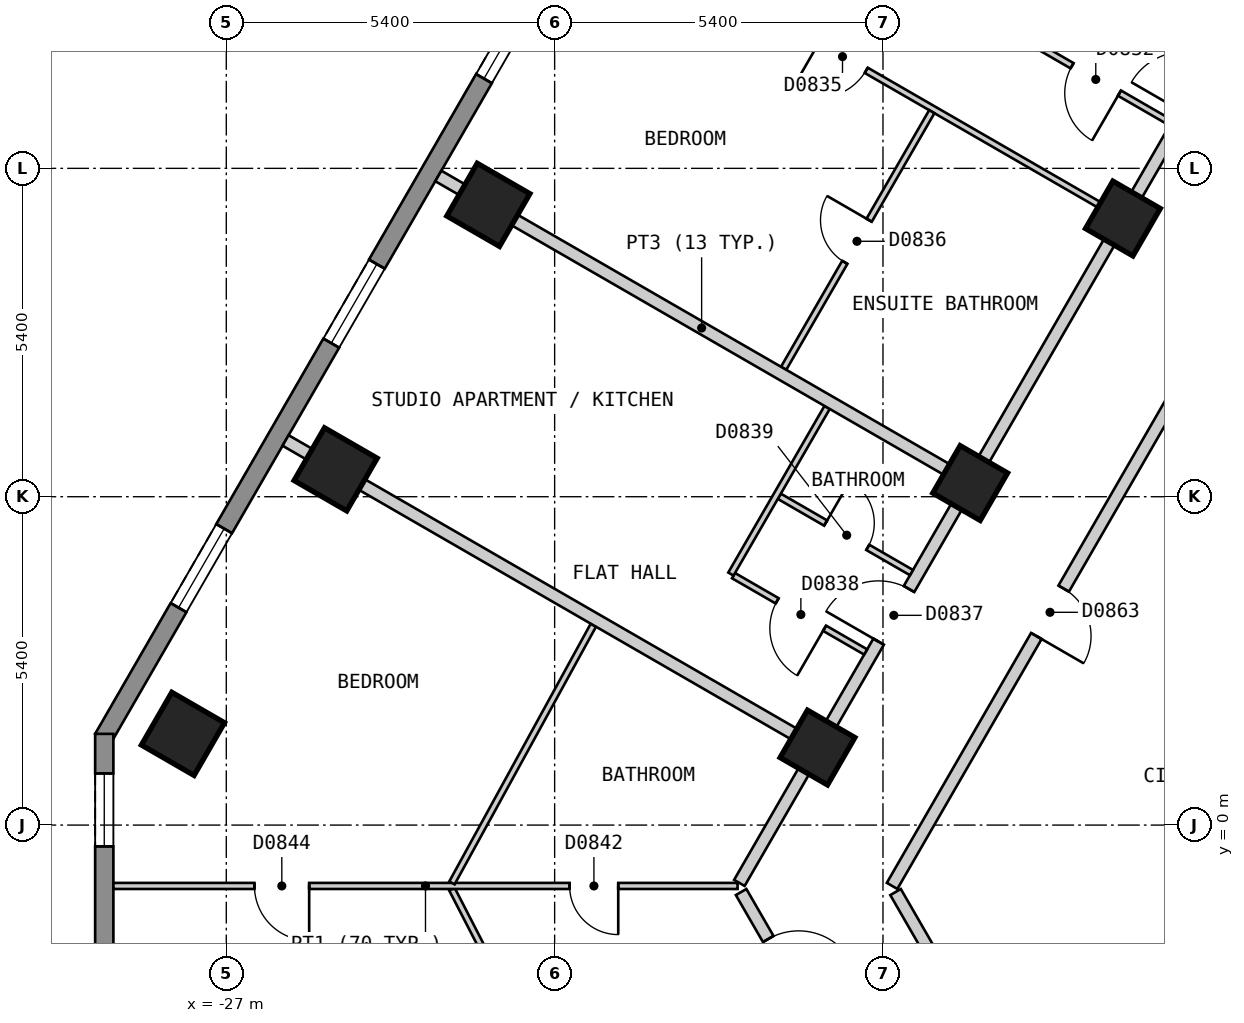
"""IFC4 building model, lengths in metres.
Left out: names, types, materials, properties, quantities, classifications, styles, units other than length and angle.
Written with IfcOpenShell. Run it as: python <this file> out.ifc"""

import sys

from ifc_helpers import new_model, si_unit, direction, frame, frame_2d, origin, origin_2d, place, context, subcontext, project, spatial, polyline, rectangle, outline, extrude, element, fill, save


model = new_model("IFC4")
c1 = context("Model", 3, precision=1e-05, world=origin(), true_north=direction((0.0, 1.0)))
c2 = subcontext(c1, "Body", "Model", "MODEL_VIEW")
j1 = project(units=[si_unit("LENGTHUNIT", "METRE"), si_unit("PLANEANGLEUNIT", "RADIAN")], contexts=[c1])
p1 = place(None, origin())
s1 = spatial("IfcSite", under=j1, at=p1, CompositionType="ELEMENT")
p2 = place(p1, origin())
s2 = spatial("IfcBuilding", under=s1, at=p2, CompositionType="ELEMENT")
p3 = place(p2, frame((0.0, 0.0, 72.0)))
s3 = spatial("IfcBuildingStorey", under=s2, at=p3, CompositionType="ELEMENT", Elevation=72.0)
for number, where, z_axis, x_axis in (
    (1, (-22.69, 10.2, 0.0), (0.0, 0.0, 1.0), (-0.5, -0.866, 0.0)),
    (2, (-25.202, 5.85, 0.0), (0.0, 0.0, 1.0), (-0.5, -0.866, 0.0)),
    (3, (-27.713, 1.5, 0.0), (0.0, 0.0, 1.0), (-0.5, -0.866, 0.0)),
):
    element("IfcColumn", number, at=place(p3, frame(where, z_axis=z_axis, x_axis=x_axis)), inside=s3, PredefinedType="COLUMN", context=c2, shape_type="SweptSolid", body=[
        extrude(rectangle(XDim=1.0, YDim=1.0, at=origin_2d()), origin(), (0.0, 0.0, 1.0), 3.0),
    ])
for number, where, z_axis, x_axis in (
    (4, (-12.254, 9.975, 0.0), (0.0, 0.0, 1.0), (-0.5, -0.866, 0.0)),
    (5, (-14.766, 5.625, 0.0), (0.0, 0.0, 1.0), (-0.5, -0.866, 0.0)),
    (6, (-17.277, 1.275, 0.0), (0.0, 0.0, 1.0), (-0.5, -0.866, 0.0)),
):
    element("IfcColumn", number, at=place(p3, frame(where, z_axis=z_axis, x_axis=x_axis)), inside=s3, PredefinedType="COLUMN", context=c2, shape_type="SweptSolid", body=[
        extrude(rectangle(XDim=0.9, YDim=0.9, at=origin_2d()), origin(), (0.0, 0.0, 1.0), 3.0),
    ])
p4 = place(p3, frame((-15.747, 24.425, 0.0), z_axis=(0.0, 0.0, 1.0), x_axis=(-0.500027479704, -0.866009537788, 0.0)))
e7 = element("IfcWall", 7, at=p4, inside=s3, PredefinedType="SOLIDWALL", context=c2, shape_type="SweptSolid", body=[
    extrude(outline(polyline([(0.0, -0.15), (26.559, -0.15), (26.478, 0.15), (0.08, 0.15), (0.0, -0.15)])), origin(), (0.0, 0.0, 1.0), 2.7),
])
p5 = place(p4, frame((2.483, 0.0, 0.15)))
e8 = element("IfcOpeningElement", 8, at=p5, cuts=e7, PredefinedType="OPENING", context=c2, shape_type="SweptSolid", body=[
    extrude(rectangle(XDim=1.5, YDim=2.1, at=frame_2d((0.75, 1.05))), frame((0.0, 0.16, 0.0), z_axis=(0.0, -1.0, 0.0), x_axis=(1.0, 0.0, 0.0)), (0.0, 0.0, 1.0), 0.32),
])
p6 = place(p4, frame((7.506, 0.0, 0.15)))
e9 = element("IfcOpeningElement", 9, at=p6, cuts=e7, PredefinedType="OPENING", context=c2, shape_type="SweptSolid", body=[
    extrude(rectangle(XDim=1.5, YDim=2.1, at=frame_2d((0.75, 1.05))), frame((0.0, 0.16, 0.0), z_axis=(0.0, -1.0, 0.0), x_axis=(1.0, 0.0, 0.0)), (0.0, 0.0, 1.0), 0.32),
])
p7 = place(p4, frame((12.529, 0.0, 0.15)))
e10 = element("IfcOpeningElement", 10, at=p7, cuts=e7, PredefinedType="OPENING", context=c2, shape_type="SweptSolid", body=[
    extrude(rectangle(XDim=1.5, YDim=2.1, at=frame_2d((0.75, 1.05))), frame((0.0, 0.16, 0.0), z_axis=(0.0, -1.0, 0.0), x_axis=(1.0, 0.0, 0.0)), (0.0, 0.0, 1.0), 0.32),
])
p8 = place(p4, frame((17.552, 0.0, 0.15)))
e11 = element("IfcOpeningElement", 11, at=p8, cuts=e7, PredefinedType="OPENING", context=c2, shape_type="SweptSolid", body=[
    extrude(rectangle(XDim=1.5, YDim=2.1, at=frame_2d((0.75, 1.05))), frame((0.0, 0.16, 0.0), z_axis=(0.0, -1.0, 0.0), x_axis=(1.0, 0.0, 0.0)), (0.0, 0.0, 1.0), 0.32),
])
p9 = place(p4, frame((22.575, 0.0, 0.15)))
e12 = element("IfcOpeningElement", 12, at=p9, cuts=e7, PredefinedType="OPENING", context=c2, shape_type="SweptSolid", body=[
    extrude(rectangle(XDim=1.5, YDim=2.1, at=frame_2d((0.75, 1.05))), frame((0.0, 0.16, 0.0), z_axis=(0.0, -1.0, 0.0), x_axis=(1.0, 0.0, 0.0)), (0.0, 0.0, 1.0), 0.32),
])
p10 = place(p3, frame((-29.007, 1.5, 0.0), z_axis=(0.0, 0.0, 1.0), x_axis=(0.0, -1.0, 0.0)))
e13 = element("IfcWall", 13, at=p10, inside=s3, PredefinedType="SOLIDWALL", context=c2, shape_type="SweptSolid", body=[
    extrude(outline(polyline([(0.0, -0.15), (5.0, -0.15), (4.92, 0.15), (0.08, 0.15), (0.0, -0.15)])), origin(), (0.0, 0.0, 1.0), 2.7),
])
p11 = place(p10, frame((0.65, 0.0, 0.15)))
e14 = element("IfcOpeningElement", 14, at=p11, cuts=e13, PredefinedType="OPENING", context=c2, shape_type="SweptSolid", body=[
    extrude(rectangle(XDim=1.2, YDim=2.1, at=frame_2d((0.6, 1.05))), frame((0.0, 0.16, 0.0), z_axis=(0.0, -1.0, 0.0), x_axis=(1.0, 0.0, 0.0)), (0.0, 0.0, 1.0), 0.32),
])
p12 = place(p3, frame((-15.993, -1.101, 0.0), z_axis=(0.0, 0.0, 1.0), x_axis=(0.499894174133, -0.866086493757, 0.0)))
e15 = element("IfcWall", 15, at=p12, inside=s3, PredefinedType="PARTITIONING", context=c2, shape_type="SweptSolid", body=[
    extrude(rectangle(XDim=1.846, YDim=0.2, at=frame_2d((0.923, 0.0))), origin(), (0.0, 0.0, 1.0), 2.7),
])
p13 = place(p3, frame((-18.533, -1.101, 0.0), z_axis=(0.0, 0.0, 1.0), x_axis=(0.500022085096, -0.866012652573, 0.0)))
e16 = element("IfcWall", 16, at=p13, inside=s3, PredefinedType="PARTITIONING", context=c2, shape_type="SweptSolid", body=[
    extrude(rectangle(XDim=6.066, YDim=0.2, at=frame_2d((3.033, 0.0))), origin(), (0.0, 0.0, 1.0), 2.7),
])
p14 = place(p13, frame((0.892, 0.0, 0.0)))
e17 = element("IfcOpeningElement", 17, at=p14, cuts=e16, PredefinedType="OPENING", context=c2, shape_type="SweptSolid", body=[
    extrude(rectangle(XDim=1.0, YDim=2.1, at=frame_2d((0.5, 1.05))), frame((0.0, 0.11, 0.0), z_axis=(0.0, -1.0, 0.0), x_axis=(1.0, 0.0, 0.0)), (0.0, 0.0, 1.0), 0.22),
])
p15 = place(p3, frame((-16.05, -1.0, 0.0), z_axis=(0.0, 0.0, 1.0), x_axis=(0.499962449088, 0.866047082728, 0.0)))
e18 = element("IfcWall", 18, at=p15, inside=s3, PredefinedType="PARTITIONING", context=c2, shape_type="SweptSolid", body=[
    extrude(rectangle(XDim=10.391, YDim=0.2, at=frame_2d((5.195, 0.0))), origin(), (0.0, 0.0, 1.0), 2.7),
])
p16 = place(p15, frame((4.745, 0.0, 0.0)))
e19 = element("IfcOpeningElement", 19, at=p16, cuts=e18, PredefinedType="OPENING", context=c2, shape_type="SweptSolid", body=[
    extrude(rectangle(XDim=0.9, YDim=2.1, at=frame_2d((0.45, 1.05))), frame((0.0, 0.11, 0.0), z_axis=(0.0, -1.0, 0.0), x_axis=(1.0, 0.0, 0.0)), (0.0, 0.0, 1.0), 0.22),
])
p17 = place(p3, frame((-18.562, -0.951, 0.0), z_axis=(0.0, 0.0, 1.0), x_axis=(0.499992962407, 0.866029466902, 0.0)))
e20 = element("IfcWall", 20, at=p17, inside=s3, PredefinedType="PARTITIONING", context=c2, shape_type="SweptSolid", body=[
    extrude(rectangle(XDim=20.208, YDim=0.2, at=frame_2d((10.104, 0.0))), origin(), (0.0, 0.0, 1.0), 2.7),
])
p18 = place(p17, frame((14.627, 0.0, 0.0)))
e21 = element("IfcOpeningElement", 21, at=p18, cuts=e20, PredefinedType="OPENING", context=c2, shape_type="SweptSolid", body=[
    extrude(rectangle(XDim=1.0, YDim=2.1, at=frame_2d((0.5, 1.05))), frame((0.0, 0.11, 0.0), z_axis=(0.0, -1.0, 0.0), x_axis=(1.0, 0.0, 0.0)), (0.0, 0.0, 1.0), 0.22),
])
p19 = place(p17, frame((4.581, 0.0, 0.0)))
e22 = element("IfcOpeningElement", 22, at=p19, cuts=e20, PredefinedType="OPENING", context=c2, shape_type="SweptSolid", body=[
    extrude(rectangle(XDim=1.0, YDim=2.1, at=frame_2d((0.5, 1.05))), frame((0.0, 0.11, 0.0), z_axis=(0.0, -1.0, 0.0), x_axis=(1.0, 0.0, 0.0)), (0.0, 0.0, 1.0), 0.22),
])
p20 = place(p3, frame((-23.289, -1.054, 0.0), z_axis=(0.0, 0.0, 1.0), x_axis=(0.458226112305, -0.888835659726, 0.0)))
e23 = element("IfcWall", 23, at=p20, inside=s3, PredefinedType="PARTITIONING", context=c2, shape_type="SweptSolid", body=[
    extrude(rectangle(XDim=2.104, YDim=0.1, at=frame_2d((1.052, 0.0))), origin(), (0.0, 0.0, 1.0), 2.7),
])
p21 = place(p3, frame((-17.905, 5.407, 0.0), z_axis=(0.0, 0.0, 1.0), x_axis=(0.866080321209, -0.499904868165, 0.0)))
e24 = element("IfcWall", 24, at=p21, inside=s3, PredefinedType="PARTITIONING", context=c2, shape_type="SweptSolid", body=[
    extrude(rectangle(XDim=2.51, YDim=0.1, at=frame_2d((1.255, 0.0))), origin(), (0.0, 0.0, 1.0), 2.7),
])
p22 = place(p21, frame((0.88, 0.0, 0.0)))
e25 = element("IfcOpeningElement", 25, at=p22, cuts=e24, PredefinedType="OPENING", context=c2, shape_type="SweptSolid", body=[
    extrude(rectangle(XDim=0.8, YDim=2.1, at=frame_2d((0.4, 1.05))), frame((0.0, 0.06, 0.0), z_axis=(0.0, -1.0, 0.0), x_axis=(1.0, 0.0, 0.0)), (0.0, 0.0, 1.0), 0.12),
])
p23 = place(p3, frame((-18.658, 4.102, 0.0), z_axis=(0.0, 0.0, 1.0), x_axis=(0.865916579361, -0.500188442078, 0.0)))
e26 = element("IfcWall", 26, at=p23, inside=s3, PredefinedType="PARTITIONING", context=c2, shape_type="SweptSolid", body=[
    extrude(rectangle(XDim=2.509, YDim=0.1, at=frame_2d((1.255, 0.0))), origin(), (0.0, 0.0, 1.0), 2.7),
])
p24 = place(p23, frame((0.829, 0.0, 0.0)))
e27 = element("IfcOpeningElement", 27, at=p24, cuts=e26, PredefinedType="OPENING", context=c2, shape_type="SweptSolid", body=[
    extrude(rectangle(XDim=0.9, YDim=2.1, at=frame_2d((0.45, 1.05))), frame((0.0, 0.06, 0.0), z_axis=(0.0, -1.0, 0.0), x_axis=(1.0, 0.0, 0.0)), (0.0, 0.0, 1.0), 0.12),
])
p25 = place(p3, frame((-13.981, 13.002, 0.0), z_axis=(0.0, 0.0, 1.0), x_axis=(0.86595634977, -0.500119585993, 0.0)))
e28 = element("IfcWall", 28, at=p25, inside=s3, PredefinedType="PARTITIONING", context=c2, shape_type="SweptSolid", body=[
    extrude(rectangle(XDim=2.909, YDim=0.1, at=frame_2d((1.455, 0.0))), origin(), (0.0, 0.0, 1.0), 2.7),
])
p26 = place(p25, frame((1.029, 0.0, 0.0)))
e29 = element("IfcOpeningElement", 29, at=p26, cuts=e28, PredefinedType="OPENING", context=c2, shape_type="SweptSolid", body=[
    extrude(rectangle(XDim=0.9, YDim=2.1, at=frame_2d((0.45, 1.05))), frame((0.0, 0.06, 0.0), z_axis=(0.0, -1.0, 0.0), x_axis=(1.0, 0.0, 0.0)), (0.0, 0.0, 1.0), 0.12),
])
p27 = place(p3, frame((-21.001, 15.025, 0.0), z_axis=(0.0, 0.0, 1.0), x_axis=(0.866016855193, -0.500014806302, 0.0)))
e30 = element("IfcWall", 30, at=p27, inside=s3, PredefinedType="PARTITIONING", context=c2, shape_type="SweptSolid", body=[
    extrude(rectangle(XDim=10.0, YDim=0.1, at=frame_2d((5.0, 0.0))), origin(), (0.0, 0.0, 1.0), 2.7),
])
p28 = place(p27, frame((4.325, 0.0, 0.0)))
e31 = element("IfcOpeningElement", 31, at=p28, cuts=e30, PredefinedType="OPENING", context=c2, shape_type="SweptSolid", body=[
    extrude(rectangle(XDim=0.9, YDim=2.1, at=frame_2d((0.45, 1.05))), frame((0.0, 0.06, 0.0), z_axis=(0.0, -1.0, 0.0), x_axis=(1.0, 0.0, 0.0)), (0.0, 0.0, 1.0), 0.12),
])
p29 = place(p3, frame((-28.857, -1.001, 0.0), z_axis=(0.0, 0.0, 1.0), x_axis=(1.0, 0.0, 0.0)))
e32 = element("IfcWall", 32, at=p29, inside=s3, PredefinedType="PARTITIONING", context=c2, shape_type="SweptSolid", body=[
    extrude(rectangle(XDim=10.266, YDim=0.1, at=frame_2d((5.133, 0.0))), origin(), (0.0, 0.0, 1.0), 2.7),
])
p30 = place(p29, frame((7.503, 0.0, 0.0)))
e33 = element("IfcOpeningElement", 33, at=p30, cuts=e32, PredefinedType="OPENING", context=c2, shape_type="SweptSolid", body=[
    extrude(rectangle(XDim=0.8, YDim=2.1, at=frame_2d((0.4, 1.05))), frame((0.0, 0.06, 0.0), z_axis=(0.0, -1.0, 0.0), x_axis=(1.0, 0.0, 0.0)), (0.0, 0.0, 1.0), 0.12),
])
p31 = place(p29, frame((2.32, 0.0, 0.0)))
e34 = element("IfcOpeningElement", 34, at=p31, cuts=e32, PredefinedType="OPENING", context=c2, shape_type="SweptSolid", body=[
    extrude(rectangle(XDim=0.9, YDim=2.1, at=frame_2d((0.45, 1.05))), frame((0.0, 0.06, 0.0), z_axis=(0.0, -1.0, 0.0), x_axis=(1.0, 0.0, 0.0)), (0.0, 0.0, 1.0), 0.12),
])
p32 = place(p3, frame((-18.701, 4.128, 0.0), z_axis=(0.0, 0.0, 1.0), x_axis=(0.500023029176, 0.866012107475, 0.0)))
e35 = element("IfcWall", 35, at=p32, inside=s3, PredefinedType="PARTITIONING", context=c2, shape_type="SweptSolid", body=[
    extrude(rectangle(XDim=3.164, YDim=0.1, at=frame_2d((1.582, 0.0))), origin(), (0.0, 0.0, 1.0), 2.7),
])
p33 = place(p3, frame((-17.834, 7.512, 0.0), z_axis=(0.0, 0.0, 1.0), x_axis=(0.500093956194, 0.865971151354, 0.0)))
e36 = element("IfcWall", 36, at=p33, inside=s3, PredefinedType="PARTITIONING", context=c2, shape_type="SweptSolid", body=[
    extrude(rectangle(XDim=4.873, YDim=0.1, at=frame_2d((2.437, 0.0))), origin(), (0.0, 0.0, 1.0), 2.7),
])
p34 = place(p33, frame((2.012, 0.0, 0.0)))
e37 = element("IfcOpeningElement", 37, at=p34, cuts=e36, PredefinedType="OPENING", context=c2, shape_type="SweptSolid", body=[
    extrude(rectangle(XDim=0.8, YDim=2.1, at=frame_2d((0.4, 1.05))), frame((0.0, 0.06, 0.0), z_axis=(0.0, -1.0, 0.0), x_axis=(1.0, 0.0, 0.0)), (0.0, 0.0, 1.0), 0.12),
])
p35 = place(p3, frame((-23.289, -0.951, 0.0), z_axis=(0.0, 0.0, 1.0), x_axis=(0.481164463081, 0.876630343684, 0.0)))
e38 = element("IfcWall", 38, at=p35, inside=s3, PredefinedType="PARTITIONING", context=c2, shape_type="SweptSolid", body=[
    extrude(rectangle(XDim=4.834, YDim=0.1, at=frame_2d((2.417, 0.0))), origin(), (0.0, 0.0, 1.0), 2.7),
])
for number, where, z_axis, x_axis in (
    (39, (-26.025, 6.325, 0.0), (0.0, 0.0, 1.0), (0.866, -0.5, 0.0)),
    (40, (-23.513, 10.675, 0.0), (0.0, 0.0, 1.0), (0.866, -0.5, 0.0)),
):
    element("IfcWall", number, at=place(p3, frame(where, z_axis=z_axis, x_axis=x_axis)), inside=s3, PredefinedType="PARTITIONING", context=c2, shape_type="SweptSolid", body=[
        extrude(rectangle(XDim=10.0, YDim=0.2, at=frame_2d((5.0, 0.0))), origin(), (0.0, 0.0, 1.0), 2.7),
    ])
p36 = place(p7, origin())
e41 = element("IfcWindow", 41, at=p36, inside=s3, PartitioningType="SINGLE_PANEL", PredefinedType="WINDOW", context=c2, shape_type="SweptSolid", body=[
    extrude(rectangle(XDim=1.5, YDim=2.1, at=frame_2d((0.75, 1.05))), frame((0.0, 0.03, 0.0), z_axis=(0.0, -1.0, 0.0), x_axis=(1.0, 0.0, 0.0)), (0.0, 0.0, 1.0), 0.06),
])
fill(e10, e41)
p37 = place(p8, origin())
e42 = element("IfcWindow", 42, at=p37, inside=s3, PartitioningType="SINGLE_PANEL", PredefinedType="WINDOW", context=c2, shape_type="SweptSolid", body=[
    extrude(rectangle(XDim=1.5, YDim=2.1, at=frame_2d((0.75, 1.05))), frame((0.0, 0.03, 0.0), z_axis=(0.0, -1.0, 0.0), x_axis=(1.0, 0.0, 0.0)), (0.0, 0.0, 1.0), 0.06),
])
fill(e11, e42)
p38 = place(p9, origin())
e43 = element("IfcWindow", 43, at=p38, inside=s3, PartitioningType="SINGLE_PANEL", PredefinedType="WINDOW", context=c2, shape_type="SweptSolid", body=[
    extrude(rectangle(XDim=1.5, YDim=2.1, at=frame_2d((0.75, 1.05))), frame((0.0, 0.03, 0.0), z_axis=(0.0, -1.0, 0.0), x_axis=(1.0, 0.0, 0.0)), (0.0, 0.0, 1.0), 0.06),
])
fill(e12, e43)
p39 = place(p11, origin())
e44 = element("IfcWindow", 44, at=p39, inside=s3, PartitioningType="SINGLE_PANEL", PredefinedType="WINDOW", context=c2, shape_type="SweptSolid", body=[
    extrude(rectangle(XDim=1.2, YDim=2.1, at=frame_2d((0.6, 1.05))), frame((0.0, 0.03, 0.0), z_axis=(0.0, -1.0, 0.0), x_axis=(1.0, 0.0, 0.0)), (0.0, 0.0, 1.0), 0.06),
])
fill(e14, e44)
p40 = place(p26, origin())
e45 = element("IfcDoor", 45, at=p40, inside=s3, OperationType="SINGLE_SWING_RIGHT", PredefinedType="DOOR", context=c2, shape_type="SweptSolid", body=[
    extrude(rectangle(XDim=0.9, YDim=2.1, at=frame_2d((0.45, 1.05))), frame((0.0, 0.025, 0.0), z_axis=(0.0, -1.0, 0.0), x_axis=(1.0, 0.0, 0.0)), (0.0, 0.0, 1.0), 0.05),
])
fill(e29, e45)
p41 = place(p28, origin())
e46 = element("IfcDoor", 46, at=p41, inside=s3, OperationType="SINGLE_SWING_LEFT", PredefinedType="DOOR", context=c2, shape_type="SweptSolid", body=[
    extrude(rectangle(XDim=0.9, YDim=2.1, at=frame_2d((0.45, 1.05))), frame((0.0, 0.025, 0.0), z_axis=(0.0, -1.0, 0.0), x_axis=(1.0, 0.0, 0.0)), (0.0, 0.0, 1.0), 0.05),
])
fill(e31, e46)
p42 = place(p34, origin())
e47 = element("IfcDoor", 47, at=p42, inside=s3, OperationType="SINGLE_SWING_RIGHT", PredefinedType="DOOR", context=c2, shape_type="SweptSolid", body=[
    extrude(rectangle(XDim=0.8, YDim=2.1, at=frame_2d((0.4, 1.05))), frame((0.0, 0.025, 0.0), z_axis=(0.0, -1.0, 0.0), x_axis=(1.0, 0.0, 0.0)), (0.0, 0.0, 1.0), 0.05),
])
fill(e37, e47)
p43 = place(p19, origin())
e48 = element("IfcDoor", 48, at=p43, inside=s3, OperationType="SINGLE_SWING_LEFT", PredefinedType="DOOR", context=c2, shape_type="SweptSolid", body=[
    extrude(rectangle(XDim=1.0, YDim=2.1, at=frame_2d((0.5, 1.05))), frame((0.0, 0.025, 0.0), z_axis=(0.0, -1.0, 0.0), x_axis=(1.0, 0.0, 0.0)), (0.0, 0.0, 1.0), 0.05),
])
fill(e22, e48)
p44 = place(p24, origin())
e49 = element("IfcDoor", 49, at=p44, inside=s3, OperationType="SINGLE_SWING_RIGHT", PredefinedType="DOOR", context=c2, shape_type="SweptSolid", body=[
    extrude(rectangle(XDim=0.9, YDim=2.1, at=frame_2d((0.45, 1.05))), frame((0.0, 0.025, 0.0), z_axis=(0.0, -1.0, 0.0), x_axis=(1.0, 0.0, 0.0)), (0.0, 0.0, 1.0), 0.05),
])
fill(e27, e49)
p45 = place(p22, origin())
e50 = element("IfcDoor", 50, at=p45, inside=s3, OperationType="SINGLE_SWING_LEFT", PredefinedType="DOOR", context=c2, shape_type="SweptSolid", body=[
    extrude(rectangle(XDim=0.8, YDim=2.1, at=frame_2d((0.4, 1.05))), frame((0.0, 0.025, 0.0), z_axis=(0.0, -1.0, 0.0), x_axis=(1.0, 0.0, 0.0)), (0.0, 0.0, 1.0), 0.05),
])
fill(e25, e50)
p46 = place(p14, origin())
e51 = element("IfcDoor", 51, at=p46, inside=s3, OperationType="SINGLE_SWING_RIGHT", PredefinedType="DOOR", context=c2, shape_type="SweptSolid", body=[
    extrude(rectangle(XDim=1.0, YDim=2.1, at=frame_2d((0.5, 1.05))), frame((0.0, 0.025, 0.0), z_axis=(0.0, -1.0, 0.0), x_axis=(1.0, 0.0, 0.0)), (0.0, 0.0, 1.0), 0.05),
])
fill(e17, e51)
p47 = place(p30, origin())
e52 = element("IfcDoor", 52, at=p47, inside=s3, OperationType="SINGLE_SWING_RIGHT", PredefinedType="DOOR", context=c2, shape_type="SweptSolid", body=[
    extrude(rectangle(XDim=0.8, YDim=2.1, at=frame_2d((0.4, 1.05))), frame((0.0, 0.025, 0.0), z_axis=(0.0, -1.0, 0.0), x_axis=(1.0, 0.0, 0.0)), (0.0, 0.0, 1.0), 0.05),
])
fill(e33, e52)
p48 = place(p31, origin())
e53 = element("IfcDoor", 53, at=p48, inside=s3, OperationType="SINGLE_SWING_RIGHT", PredefinedType="DOOR", context=c2, shape_type="SweptSolid", body=[
    extrude(rectangle(XDim=0.9, YDim=2.1, at=frame_2d((0.45, 1.05))), frame((0.0, 0.025, 0.0), z_axis=(0.0, -1.0, 0.0), x_axis=(1.0, 0.0, 0.0)), (0.0, 0.0, 1.0), 0.05),
])
fill(e34, e53)
p49 = place(p16, origin())
e54 = element("IfcDoor", 54, at=p49, inside=s3, OperationType="SINGLE_SWING_LEFT", PredefinedType="DOOR", context=c2, shape_type="SweptSolid", body=[
    extrude(rectangle(XDim=0.9, YDim=2.1, at=frame_2d((0.45, 1.05))), frame((0.0, 0.025, 0.0), z_axis=(0.0, -1.0, 0.0), x_axis=(1.0, 0.0, 0.0)), (0.0, 0.0, 1.0), 0.05),
])
fill(e19, e54)
save(model, sys.argv[1])
